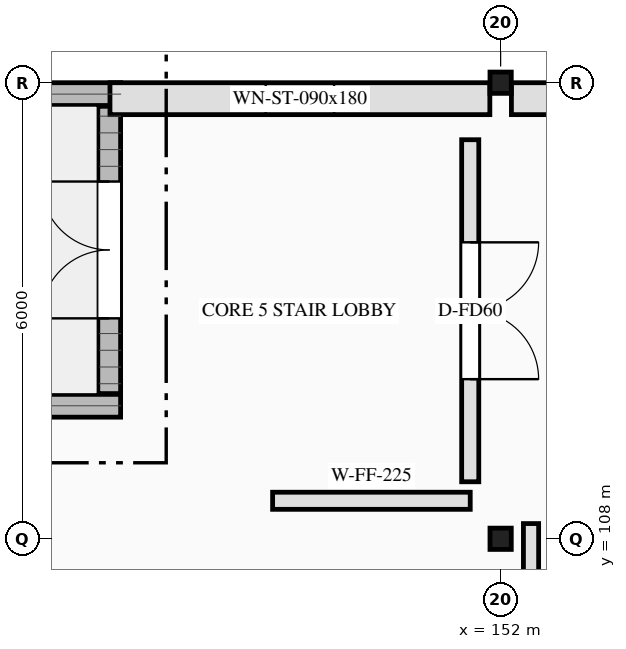
"""IFC4 building model, lengths in metres.
Left out: names, types, materials, properties, quantities, classifications, styles, units other than length and angle.
Written with IfcOpenShell. Run it as: python <this file> out.ifc"""

import sys

from ifc_helpers import new_model, si_unit, direction, frame, frame_2d, origin, origin_2d, place, context, subcontext, project, spatial, rectangle, i_section, extrude, element, fill, save


model = new_model("IFC4")
c1 = context("Model", 3, precision=1e-05, world=origin(), true_north=direction((0.0, 1.0)))
c2 = subcontext(c1, "Body", "Model", "MODEL_VIEW")
j1 = project(units=[si_unit("LENGTHUNIT", "METRE"), si_unit("PLANEANGLEUNIT", "RADIAN")], contexts=[c1])
p1 = place(None, origin())
s1 = spatial("IfcSite", under=j1, at=p1, CompositionType="ELEMENT")
p2 = place(p1, origin())
s2 = spatial("IfcBuilding", under=s1, at=p2, CompositionType="ELEMENT")
p3 = place(p2, frame((0.0, 0.0, 9.6)))
s3 = spatial("IfcBuildingStorey", under=s2, at=p3, CompositionType="ELEMENT", Elevation=9.6)
for number, where, z_axis, x_axis in (
    (1, (137.0, 109.75, 0.0), (0.0, 0.0, 1.0), (1.0, 0.0, 0.0)),
    (2, (137.0, 113.85, 0.0), (0.0, 0.0, 1.0), (1.0, 0.0, 0.0)),
):
    element("IfcWall", number, at=place(p3, frame(where, z_axis=z_axis, x_axis=x_axis)), inside=s3, PredefinedType="SHEAR", context=c2, shape_type="SweptSolid", body=[
        extrude(rectangle(XDim=10.0, YDim=0.3, at=frame_2d((5.0, 0.0))), origin(), (0.0, 0.0, 1.0), 8.0),
    ])
p4 = place(p3, frame((146.85, 109.91, 0.0), z_axis=(0.0, 0.0, 1.0), x_axis=(0.0, 1.0, 0.0)))
e3 = element("IfcWall", 3, at=p4, inside=s3, PredefinedType="SHEAR", context=c2, shape_type="SweptSolid", body=[
    extrude(rectangle(XDim=3.78, YDim=0.3, at=frame_2d((1.89, 0.0))), origin(), (0.0, 0.0, 1.0), 8.0),
])
p5 = place(p4, frame((0.99, 0.0, 0.0)))
e4 = element("IfcOpeningElement", 4, at=p5, cuts=e3, PredefinedType="OPENING", context=c2, shape_type="SweptSolid", body=[
    extrude(rectangle(XDim=1.8, YDim=2.2, at=frame_2d((0.9, 1.1))), frame((0.0, 0.16, 0.0), z_axis=(0.0, -1.0, 0.0), x_axis=(1.0, 0.0, 0.0)), (0.0, 0.0, 1.0), 0.32),
])
for number, where, z_axis, x_axis in (
    (5, (152.0, 108.0, 0.0), (0.0, 0.0, 1.0), (1.0, 0.0, 0.0)),
    (6, (152.0, 114.0, 0.0), (0.0, 0.0, 1.0), (1.0, 0.0, 0.0)),
):
    element("IfcColumn", number, at=place(p3, frame(where, z_axis=z_axis, x_axis=x_axis)), inside=s3, PredefinedType="COLUMN", context=c2, shape_type="SweptSolid", body=[
        extrude(i_section(OverallWidth=0.28, OverallDepth=0.28, WebThickness=0.01, FlangeThickness=0.018, FilletRadius=0.024, at=origin_2d()), origin(), (0.0, 0.0, 1.0), 8.0),
    ])
p6 = place(p3, frame((146.86, 113.79, 0.0), z_axis=(0.0, 0.0, 1.0), x_axis=(1.0, 0.0, 0.0)))
e7 = element("IfcWall", 7, at=p6, inside=s3, PredefinedType="SOLIDWALL", context=c2, shape_type="SweptSolid", body=[
    extrude(rectangle(XDim=4.998, YDim=0.42, at=frame_2d((2.499, 0.0))), origin(), (0.0, 0.0, 1.0), 7.245),
])
p7 = place(p6, frame((2.049, 0.0, 0.85)))
e8 = element("IfcOpeningElement", 8, at=p7, cuts=e7, PredefinedType="OPENING", context=c2, shape_type="SweptSolid", body=[
    extrude(rectangle(XDim=0.9, YDim=1.8, at=frame_2d((0.45, 0.9))), frame((0.0, 0.22, 0.0), z_axis=(0.0, -1.0, 0.0), x_axis=(1.0, 0.0, 0.0)), (0.0, 0.0, 1.0), 0.44),
])
p8 = place(p3, frame((152.142, 113.79, 0.0), z_axis=(0.0, 0.0, 1.0), x_axis=(1.0, 0.0, 0.0)))
e9 = element("IfcWall", 9, at=p8, inside=s3, PredefinedType="SOLIDWALL", context=c2, shape_type="SweptSolid", body=[
    extrude(rectangle(XDim=7.716, YDim=0.42, at=frame_2d((3.858, 0.0))), origin(), (0.0, 0.0, 1.0), 7.245),
])
p9 = place(p3, frame((149.0, 108.5, 0.0), z_axis=(0.0, 0.0, 1.0), x_axis=(1.0, 0.0, 0.0)))
e10 = element("IfcWall", 10, at=p9, inside=s3, PredefinedType="SOLIDWALL", context=c2, shape_type="SweptSolid", body=[
    extrude(rectangle(XDim=2.6, YDim=0.225, at=frame_2d((1.3, 0.0))), origin(), (0.0, 0.0, 1.0), 7.74),
])
p10 = place(p3, frame((152.4, 48.8, 0.0), z_axis=(0.0, 0.0, 1.0), x_axis=(0.0, 1.0, 0.0)))
e11 = element("IfcWall", 11, at=p10, inside=s3, PredefinedType="PARTITIONING", context=c2, shape_type="SweptSolid", body=[
    extrude(rectangle(XDim=59.4, YDim=0.2, at=frame_2d((29.7, 0.0))), origin(), (0.0, 0.0, 1.0), 7.74),
])
p11 = place(p10, frame((8.7, 0.0, 0.0)))
e12 = element("IfcOpeningElement", 12, at=p11, cuts=e11, PredefinedType="OPENING", context=c2, shape_type="SweptSolid", body=[
    extrude(rectangle(XDim=1.05, YDim=2.25, at=frame_2d((0.525, 1.125))), frame((0.0, 0.11, 0.0), z_axis=(0.0, -1.0, 0.0), x_axis=(1.0, 0.0, 0.0)), (0.0, 0.0, 1.0), 0.22),
])
p12 = place(p3, frame((151.6, 113.25, 0.0), z_axis=(0.0, 0.0, 1.0), x_axis=(0.0, -1.0, 0.0)))
e13 = element("IfcWall", 13, at=p12, inside=s3, PredefinedType="SOLIDWALL", context=c2, shape_type="SweptSolid", body=[
    extrude(rectangle(XDim=4.5, YDim=0.225, at=frame_2d((2.25, 0.0))), origin(), (0.0, 0.0, 1.0), 7.74),
])
p13 = place(p12, frame((1.35, 0.0, 0.0)))
e14 = element("IfcOpeningElement", 14, at=p13, cuts=e13, PredefinedType="OPENING", context=c2, shape_type="SweptSolid", body=[
    extrude(rectangle(XDim=1.8, YDim=2.2, at=frame_2d((0.9, 1.1))), frame((0.0, 0.123, 0.0), z_axis=(0.0, -1.0, 0.0), x_axis=(1.0, 0.0, 0.0)), (0.0, 0.0, 1.0), 0.245),
])
p14 = place(p7, origin())
e15 = element("IfcWindow", 15, at=p14, inside=s3, PartitioningType="SINGLE_PANEL", PredefinedType="WINDOW", context=c2, shape_type="SweptSolid", body=[
    extrude(rectangle(XDim=0.9, YDim=1.8, at=frame_2d((0.45, 0.9))), frame((0.0, 0.03, 0.0), z_axis=(0.0, -1.0, 0.0), x_axis=(1.0, 0.0, 0.0)), (0.0, 0.0, 1.0), 0.06),
])
fill(e8, e15)
p15 = place(p5, origin())
e16 = element("IfcDoor", 16, at=p15, inside=s3, OperationType="DOUBLE_DOOR_SINGLE_SWING", PredefinedType="DOOR", context=c2, shape_type="SweptSolid", body=[
    extrude(rectangle(XDim=1.8, YDim=2.2, at=frame_2d((0.9, 1.1))), frame((0.0, 0.025, 0.0), z_axis=(0.0, -1.0, 0.0), x_axis=(1.0, 0.0, 0.0)), (0.0, 0.0, 1.0), 0.05),
])
fill(e4, e16)
p16 = place(p13, origin())
e17 = element("IfcDoor", 17, at=p16, inside=s3, OperationType="DOUBLE_DOOR_SINGLE_SWING", PredefinedType="DOOR", context=c2, shape_type="SweptSolid", body=[
    extrude(rectangle(XDim=1.8, YDim=2.2, at=frame_2d((0.9, 1.1))), frame((0.0, 0.025, 0.0), z_axis=(0.0, -1.0, 0.0), x_axis=(1.0, 0.0, 0.0)), (0.0, 0.0, 1.0), 0.05),
])
fill(e14, e17)
save(model, sys.argv[1])
